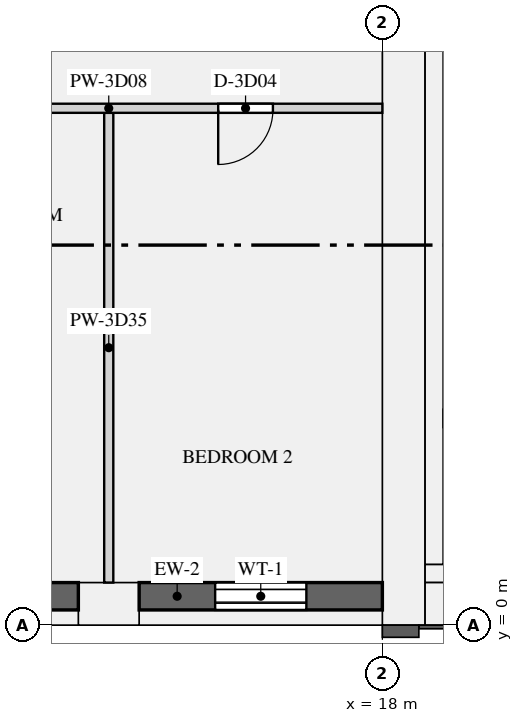
"""IFC4 building model, lengths in metres.
Left out: names, types, materials, properties, quantities, classifications, styles, units other than length and angle.
Written with IfcOpenShell. Run it as: python <this file> out.ifc"""

import sys

from ifc_helpers import new_model, si_unit, direction, frame, frame_2d, origin, origin_2d, place, context, subcontext, project, spatial, rectangle, extrude, element, fill, save


model = new_model("IFC4")
c1 = context("Model", 3, precision=1e-05, world=origin(), true_north=direction((0.0, 1.0)))
c2 = subcontext(c1, "Body", "Model", "MODEL_VIEW")
j1 = project(units=[si_unit("LENGTHUNIT", "METRE"), si_unit("PLANEANGLEUNIT", "RADIAN")], contexts=[c1])
p1 = place(None, origin())
s1 = spatial("IfcSite", under=j1, at=p1, CompositionType="ELEMENT")
p2 = place(p1, origin())
s2 = spatial("IfcBuilding", under=s1, at=p2, CompositionType="ELEMENT")
p3 = place(p2, frame((0.0, 0.0, 166.5)))
s3 = spatial("IfcBuildingStorey", under=s2, at=p3, CompositionType="ELEMENT", Elevation=166.5)
p4 = place(p3, frame((13.5, 0.35, 0.0), z_axis=(0.0, 0.0, 1.0), x_axis=(1.0, 0.0, 0.0)))
e1 = element("IfcColumn", 1, at=p4, inside=s3, PredefinedType="USERDEFINED", context=c2, shape_type="SweptSolid", body=[
    extrude(rectangle(XDim=1.0, YDim=0.7, at=origin_2d()), origin(), (0.0, 0.0, 1.0), 3.15),
])
p5 = place(p3, frame((18.35, 0.0, 0.0), z_axis=(0.0, 0.0, 1.0), x_axis=(0.0, 1.0, 0.0)))
e2 = element("IfcWall", 2, at=p5, inside=s3, PredefinedType="SHEAR", context=c2, shape_type="SweptSolid", body=[
    extrude(rectangle(XDim=12.5, YDim=0.7, at=frame_2d((6.25, 0.0))), origin(), (0.0, 0.0, 1.0), 3.15),
])
p6 = place(p3, frame((18.7, 0.35, 0.0), z_axis=(0.0, 0.0, 1.0), x_axis=(1.0, 0.0, 0.0)))
e3 = element("IfcWall", 3, at=p6, inside=s3, PredefinedType="SHEAR", context=c2, shape_type="SweptSolid", body=[
    extrude(rectangle(XDim=34.6, YDim=0.7, at=frame_2d((17.3, 0.0))), origin(), (0.0, 0.0, 1.0), 3.15),
])
p7 = place(p3, frame((18.85, 1.0, 0.0), z_axis=(0.0, 0.0, 1.0), x_axis=(0.0, 1.0, 0.0)))
e4 = element("IfcWall", 4, at=p7, inside=s3, PredefinedType="SHEAR", context=c2, shape_type="SweptSolid", body=[
    extrude(rectangle(XDim=10.9, YDim=0.3, at=frame_2d((5.45, 0.0))), origin(), (0.0, 0.0, 1.0), 3.15),
])
p8 = place(p3, frame((18.7, 0.85, 0.0), z_axis=(0.0, 0.0, 1.0), x_axis=(1.0, 0.0, 0.0)))
e5 = element("IfcWall", 5, at=p8, inside=s3, PredefinedType="SHEAR", context=c2, shape_type="SweptSolid", body=[
    extrude(rectangle(XDim=34.6, YDim=0.3, at=frame_2d((17.3, 0.0))), origin(), (0.0, 0.0, 1.0), 3.15),
])
p9 = place(p3, frame((19.0, 3.4, 0.0), z_axis=(0.0, 0.0, 1.0), x_axis=(1.0, 0.0, 0.0)))
e6 = element("IfcWall", 6, at=p9, inside=s3, PredefinedType="SHEAR", context=c2, shape_type="SweptSolid", body=[
    extrude(rectangle(XDim=2.55, YDim=0.3, at=frame_2d((1.275, 0.0))), origin(), (0.0, 0.0, 1.0), 3.15),
])
p10 = place(p9, frame((0.675, 0.0, 0.0)))
e7 = element("IfcOpeningElement", 7, at=p10, cuts=e6, PredefinedType="OPENING", context=c2, shape_type="SweptSolid", body=[
    extrude(rectangle(XDim=1.2, YDim=2.1, at=frame_2d((0.6, 1.05))), frame((0.0, 0.16, 0.0), z_axis=(0.0, -1.0, 0.0), x_axis=(1.0, 0.0, 0.0)), (0.0, 0.0, 1.0), 0.32),
])
p11 = place(p3, frame((10.0, 0.475, 0.9), z_axis=(0.0, 0.0, 1.0), x_axis=(1.0, 0.0, 0.0)))
e8 = element("IfcWall", 8, at=p11, inside=s3, PredefinedType="SOLIDWALL", context=c2, shape_type="SweptSolid", body=[
    extrude(rectangle(XDim=3.0, YDim=0.45, at=frame_2d((1.5, 0.0))), origin(), (0.0, 0.0, 1.0), 1.93),
])
p12 = place(p11, frame((0.75, 0.0, 0.15)))
e9 = element("IfcOpeningElement", 9, at=p12, cuts=e8, PredefinedType="OPENING", context=c2, shape_type="SweptSolid", body=[
    extrude(rectangle(XDim=1.5, YDim=1.5, at=frame_2d((0.75, 0.75))), frame((0.0, 0.235, 0.0), z_axis=(0.0, -1.0, 0.0), x_axis=(1.0, 0.0, 0.0)), (0.0, 0.0, 1.0), 0.47),
])
p13 = place(p3, frame((14.0, 0.475, 0.9), z_axis=(0.0, 0.0, 1.0), x_axis=(1.0, 0.0, 0.0)))
e10 = element("IfcWall", 10, at=p13, inside=s3, PredefinedType="SOLIDWALL", context=c2, shape_type="SweptSolid", body=[
    extrude(rectangle(XDim=4.0, YDim=0.45, at=frame_2d((2.0, 0.0))), origin(), (0.0, 0.0, 1.0), 1.93),
])
p14 = place(p13, frame((1.25, 0.0, 0.15)))
e11 = element("IfcOpeningElement", 11, at=p14, cuts=e10, PredefinedType="OPENING", context=c2, shape_type="SweptSolid", body=[
    extrude(rectangle(XDim=1.5, YDim=1.5, at=frame_2d((0.75, 0.75))), frame((0.0, 0.235, 0.0), z_axis=(0.0, -1.0, 0.0), x_axis=(1.0, 0.0, 0.0)), (0.0, 0.0, 1.0), 0.47),
])
p15 = place(p3, frame((5.2, 8.5, 0.0), z_axis=(0.0, 0.0, 1.0), x_axis=(1.0, 0.0, 0.0)))
e12 = element("IfcWall", 12, at=p15, inside=s3, PredefinedType="PARTITIONING", context=c2, shape_type="SweptSolid", body=[
    extrude(rectangle(XDim=12.8, YDim=0.15, at=frame_2d((6.4, 0.0))), origin(), (0.0, 0.0, 1.0), 2.83),
])
p16 = place(p15, frame((10.1, 0.0, 0.0)))
e13 = element("IfcOpeningElement", 13, at=p16, cuts=e12, PredefinedType="OPENING", context=c2, shape_type="SweptSolid", body=[
    extrude(rectangle(XDim=0.9, YDim=2.1, at=frame_2d((0.45, 1.05))), frame((0.0, 0.085, 0.0), z_axis=(0.0, -1.0, 0.0), x_axis=(1.0, 0.0, 0.0)), (0.0, 0.0, 1.0), 0.17),
])
p17 = place(p15, frame((5.6, 0.0, 0.0)))
e14 = element("IfcOpeningElement", 14, at=p17, cuts=e12, PredefinedType="OPENING", context=c2, shape_type="SweptSolid", body=[
    extrude(rectangle(XDim=0.9, YDim=2.1, at=frame_2d((0.45, 1.05))), frame((0.0, 0.085, 0.0), z_axis=(0.0, -1.0, 0.0), x_axis=(1.0, 0.0, 0.0)), (0.0, 0.0, 1.0), 0.17),
])
p18 = place(p15, frame((1.375, 0.0, 0.0)))
e15 = element("IfcOpeningElement", 15, at=p18, cuts=e12, PredefinedType="OPENING", context=c2, shape_type="SweptSolid", body=[
    extrude(rectangle(XDim=0.9, YDim=2.1, at=frame_2d((0.45, 1.05))), frame((0.0, 0.085, 0.0), z_axis=(0.0, -1.0, 0.0), x_axis=(1.0, 0.0, 0.0)), (0.0, 0.0, 1.0), 0.17),
])
p19 = place(p3, frame((13.5, 0.7, 0.0), z_axis=(0.0, 0.0, 1.0), x_axis=(0.0, 1.0, 0.0)))
e16 = element("IfcWall", 16, at=p19, inside=s3, PredefinedType="PARTITIONING", context=c2, shape_type="SweptSolid", body=[
    extrude(rectangle(XDim=7.725, YDim=0.15, at=frame_2d((3.863, 0.0))), origin(), (0.0, 0.0, 1.0), 2.83),
])
p20 = place(p14, origin())
e17 = element("IfcWindow", 17, at=p20, inside=s3, PartitioningType="SINGLE_PANEL", PredefinedType="WINDOW", context=c2, shape_type="SweptSolid", body=[
    extrude(rectangle(XDim=1.5, YDim=1.5, at=frame_2d((0.75, 0.75))), frame((0.0, -0.065, 0.0), z_axis=(0.0, -1.0, 0.0), x_axis=(1.0, 0.0, 0.0)), (0.0, 0.0, 1.0), 0.06),
])
fill(e11, e17)
p21 = place(p16, frame((0.9, 0.0, 0.0), z_axis=(0.0, 0.0, 1.0), x_axis=(-1.0, 0.0, 0.0)))
e18 = element("IfcDoor", 18, at=p21, inside=s3, OperationType="SINGLE_SWING_RIGHT", PredefinedType="DOOR", context=c2, shape_type="SweptSolid", body=[
    extrude(rectangle(XDim=0.9, YDim=2.1, at=frame_2d((0.45, 1.05))), frame((0.0, 0.025, 0.0), z_axis=(0.0, -1.0, 0.0), x_axis=(1.0, 0.0, 0.0)), (0.0, 0.0, 1.0), 0.05),
])
fill(e13, e18)
save(model, sys.argv[1])
